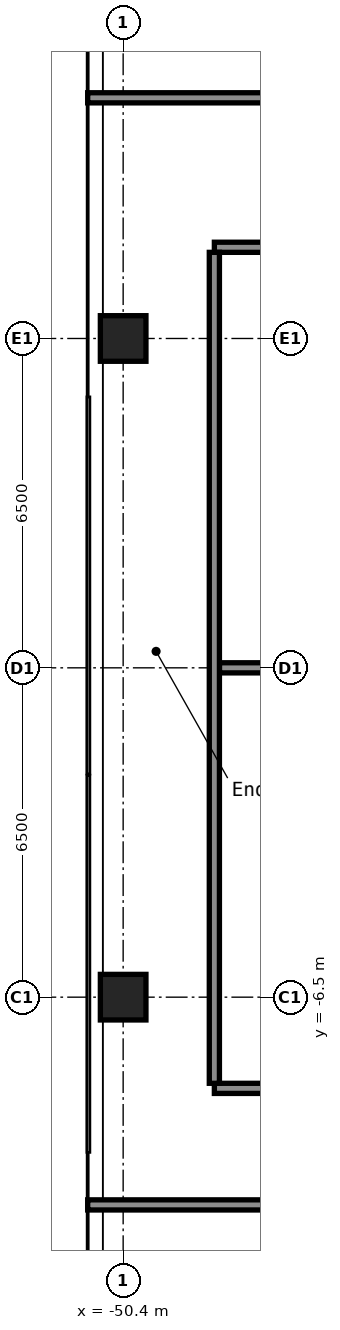
"""IFC4 building model, lengths in metres.
Left out: names, types, materials, properties, quantities, classifications, styles, units other than length and angle.
Written with IfcOpenShell. Run it as: python <this file> out.ifc"""

import sys

from ifc_helpers import new_model, si_unit, direction, frame, frame_2d, origin, origin_2d, place, context, subcontext, project, spatial, rectangle, hollow_rectangle, extrude, element, save


model = new_model("IFC4")
c1 = context("Model", 3, precision=1e-05, world=origin(), true_north=direction((0.0, 1.0)))
c2 = subcontext(c1, "Body", "Model", "MODEL_VIEW")
j1 = project(units=[si_unit("LENGTHUNIT", "METRE"), si_unit("PLANEANGLEUNIT", "RADIAN")], contexts=[c1])
p1 = place(None, origin())
s1 = spatial("IfcSite", under=j1, at=p1, CompositionType="ELEMENT")
p2 = place(p1, origin())
s2 = spatial("IfcBuilding", under=s1, at=p2, CompositionType="ELEMENT")
p3 = place(p2, frame((0.0, 0.0, 64.6)))
s3 = spatial("IfcBuildingStorey", under=s2, at=p3, CompositionType="ELEMENT", Elevation=64.6)
for number, where, z_axis, x_axis in (
    (1, (-50.4, -6.5, 0.0), (0.0, 0.0, 1.0), (1.0, 0.0, 0.0)),
    (2, (-50.4, 6.5, 0.0), (0.0, 0.0, 1.0), (1.0, 0.0, 0.0)),
):
    element("IfcColumn", number, at=place(p3, frame(where, z_axis=z_axis, x_axis=x_axis)), inside=s3, PredefinedType="COLUMN", context=c2, shape_type="SweptSolid", body=[
        extrude(hollow_rectangle(XDim=0.9, YDim=0.9, WallThickness=0.036, at=origin_2d()), origin(), (0.0, 0.0, 1.0), 4.1),
    ])
p4 = place(p3, frame((-51.1, -10.6, 0.0), z_axis=(0.0, 0.0, 1.0), x_axis=(1.0, 0.0, 0.0)))
e3 = element("IfcWall", 3, at=p4, inside=s3, PredefinedType="PARTITIONING", context=c2, shape_type="SweptSolid", body=[
    extrude(rectangle(XDim=34.3, YDim=0.2, at=frame_2d((17.15, 0.0))), origin(), (0.0, 0.0, 1.0), 4.1),
])
p5 = place(p4, frame((4.25, 0.0, 0.0)))
e4 = element("IfcOpeningElement", 4, at=p5, cuts=e3, PredefinedType="OPENING", context=c2, shape_type="SweptSolid", body=[
    extrude(rectangle(XDim=0.9, YDim=2.1, at=frame_2d((0.45, 1.05))), frame((0.0, 0.11, 0.0), z_axis=(0.0, -1.0, 0.0), x_axis=(1.0, 0.0, 0.0)), (0.0, 0.0, 1.0), 0.22),
])
p6 = place(p4, frame((12.85, 0.0, 0.0)))
e5 = element("IfcOpeningElement", 5, at=p6, cuts=e3, PredefinedType="OPENING", context=c2, shape_type="SweptSolid", body=[
    extrude(rectangle(XDim=0.9, YDim=2.1, at=frame_2d((0.45, 1.05))), frame((0.0, 0.11, 0.0), z_axis=(0.0, -1.0, 0.0), x_axis=(1.0, 0.0, 0.0)), (0.0, 0.0, 1.0), 0.22),
])
p7 = place(p4, frame((21.25, 0.0, 0.0)))
e6 = element("IfcOpeningElement", 6, at=p7, cuts=e3, PredefinedType="OPENING", context=c2, shape_type="SweptSolid", body=[
    extrude(rectangle(XDim=0.9, YDim=2.1, at=frame_2d((0.45, 1.05))), frame((0.0, 0.11, 0.0), z_axis=(0.0, -1.0, 0.0), x_axis=(1.0, 0.0, 0.0)), (0.0, 0.0, 1.0), 0.22),
])
p8 = place(p4, frame((29.65, 0.0, 0.0)))
e7 = element("IfcOpeningElement", 7, at=p8, cuts=e3, PredefinedType="OPENING", context=c2, shape_type="SweptSolid", body=[
    extrude(rectangle(XDim=0.9, YDim=2.1, at=frame_2d((0.45, 1.05))), frame((0.0, 0.11, 0.0), z_axis=(0.0, -1.0, 0.0), x_axis=(1.0, 0.0, 0.0)), (0.0, 0.0, 1.0), 0.22),
])
p9 = place(p3, frame((-48.6, -8.3, 0.0), z_axis=(0.0, 0.0, 1.0), x_axis=(1.0, 0.0, 0.0)))
e8 = element("IfcWall", 8, at=p9, inside=s3, PredefinedType="PARTITIONING", context=c2, shape_type="SweptSolid", body=[
    extrude(rectangle(XDim=15.0, YDim=0.2, at=frame_2d((7.5, 0.0))), origin(), (0.0, 0.0, 1.0), 4.1),
])
p10 = place(p9, frame((2.85, 0.0, 0.0)))
e9 = element("IfcOpeningElement", 9, at=p10, cuts=e8, PredefinedType="OPENING", context=c2, shape_type="SweptSolid", body=[
    extrude(rectangle(XDim=0.9, YDim=2.1, at=frame_2d((0.45, 1.05))), frame((0.0, 0.11, 0.0), z_axis=(0.0, -1.0, 0.0), x_axis=(1.0, 0.0, 0.0)), (0.0, 0.0, 1.0), 0.22),
])
p11 = place(p9, frame((10.35, 0.0, 0.0)))
e10 = element("IfcOpeningElement", 10, at=p11, cuts=e8, PredefinedType="OPENING", context=c2, shape_type="SweptSolid", body=[
    extrude(rectangle(XDim=0.9, YDim=2.1, at=frame_2d((0.45, 1.05))), frame((0.0, 0.11, 0.0), z_axis=(0.0, -1.0, 0.0), x_axis=(1.0, 0.0, 0.0)), (0.0, 0.0, 1.0), 0.22),
])
p12 = place(p3, frame((-48.5, 0.0, 0.0), z_axis=(0.0, 0.0, 1.0), x_axis=(1.0, 0.0, 0.0)))
e11 = element("IfcWall", 11, at=p12, inside=s3, PredefinedType="PARTITIONING", context=c2, shape_type="SweptSolid", body=[
    extrude(rectangle(XDim=14.9, YDim=0.2, at=frame_2d((7.45, 0.0))), origin(), (0.0, 0.0, 1.0), 4.1),
])
p13 = place(p3, frame((-48.6, 8.3, 0.0), z_axis=(0.0, 0.0, 1.0), x_axis=(1.0, 0.0, 0.0)))
e12 = element("IfcWall", 12, at=p13, inside=s3, PredefinedType="PARTITIONING", context=c2, shape_type="SweptSolid", body=[
    extrude(rectangle(XDim=15.0, YDim=0.2, at=frame_2d((7.5, 0.0))), origin(), (0.0, 0.0, 1.0), 4.1),
])
p14 = place(p13, frame((2.85, 0.0, 0.0)))
e13 = element("IfcOpeningElement", 13, at=p14, cuts=e12, PredefinedType="OPENING", context=c2, shape_type="SweptSolid", body=[
    extrude(rectangle(XDim=0.9, YDim=2.1, at=frame_2d((0.45, 1.05))), frame((0.0, 0.11, 0.0), z_axis=(0.0, -1.0, 0.0), x_axis=(1.0, 0.0, 0.0)), (0.0, 0.0, 1.0), 0.22),
])
p15 = place(p13, frame((10.35, 0.0, 0.0)))
e14 = element("IfcOpeningElement", 14, at=p15, cuts=e12, PredefinedType="OPENING", context=c2, shape_type="SweptSolid", body=[
    extrude(rectangle(XDim=0.9, YDim=2.1, at=frame_2d((0.45, 1.05))), frame((0.0, 0.11, 0.0), z_axis=(0.0, -1.0, 0.0), x_axis=(1.0, 0.0, 0.0)), (0.0, 0.0, 1.0), 0.22),
])
p16 = place(p3, frame((-51.1, 11.25, 0.0), z_axis=(0.0, 0.0, 1.0), x_axis=(1.0, 0.0, 0.0)))
e15 = element("IfcWall", 15, at=p16, inside=s3, PredefinedType="PARTITIONING", context=c2, shape_type="SweptSolid", body=[
    extrude(rectangle(XDim=34.3, YDim=0.2, at=frame_2d((17.15, 0.0))), origin(), (0.0, 0.0, 1.0), 4.1),
])
p17 = place(p16, frame((4.25, 0.0, 0.0)))
e16 = element("IfcOpeningElement", 16, at=p17, cuts=e15, PredefinedType="OPENING", context=c2, shape_type="SweptSolid", body=[
    extrude(rectangle(XDim=0.9, YDim=2.1, at=frame_2d((0.45, 1.05))), frame((0.0, 0.11, 0.0), z_axis=(0.0, -1.0, 0.0), x_axis=(1.0, 0.0, 0.0)), (0.0, 0.0, 1.0), 0.22),
])
p18 = place(p16, frame((12.85, 0.0, 0.0)))
e17 = element("IfcOpeningElement", 17, at=p18, cuts=e15, PredefinedType="OPENING", context=c2, shape_type="SweptSolid", body=[
    extrude(rectangle(XDim=0.9, YDim=2.1, at=frame_2d((0.45, 1.05))), frame((0.0, 0.11, 0.0), z_axis=(0.0, -1.0, 0.0), x_axis=(1.0, 0.0, 0.0)), (0.0, 0.0, 1.0), 0.22),
])
p19 = place(p16, frame((21.25, 0.0, 0.0)))
e18 = element("IfcOpeningElement", 18, at=p19, cuts=e15, PredefinedType="OPENING", context=c2, shape_type="SweptSolid", body=[
    extrude(rectangle(XDim=0.9, YDim=2.1, at=frame_2d((0.45, 1.05))), frame((0.0, 0.11, 0.0), z_axis=(0.0, -1.0, 0.0), x_axis=(1.0, 0.0, 0.0)), (0.0, 0.0, 1.0), 0.22),
])
p20 = place(p16, frame((29.65, 0.0, 0.0)))
e19 = element("IfcOpeningElement", 19, at=p20, cuts=e15, PredefinedType="OPENING", context=c2, shape_type="SweptSolid", body=[
    extrude(rectangle(XDim=0.9, YDim=2.1, at=frame_2d((0.45, 1.05))), frame((0.0, 0.11, 0.0), z_axis=(0.0, -1.0, 0.0), x_axis=(1.0, 0.0, 0.0)), (0.0, 0.0, 1.0), 0.22),
])
p21 = place(p3, frame((-48.6, -8.2, 0.0), z_axis=(0.0, 0.0, 1.0), x_axis=(0.0, 1.0, 0.0)))
e20 = element("IfcWall", 20, at=p21, inside=s3, PredefinedType="PARTITIONING", context=c2, shape_type="SweptSolid", body=[
    extrude(rectangle(XDim=16.4, YDim=0.2, at=frame_2d((8.2, 0.0))), origin(), (0.0, 0.0, 1.0), 4.1),
])
save(model, sys.argv[1])
